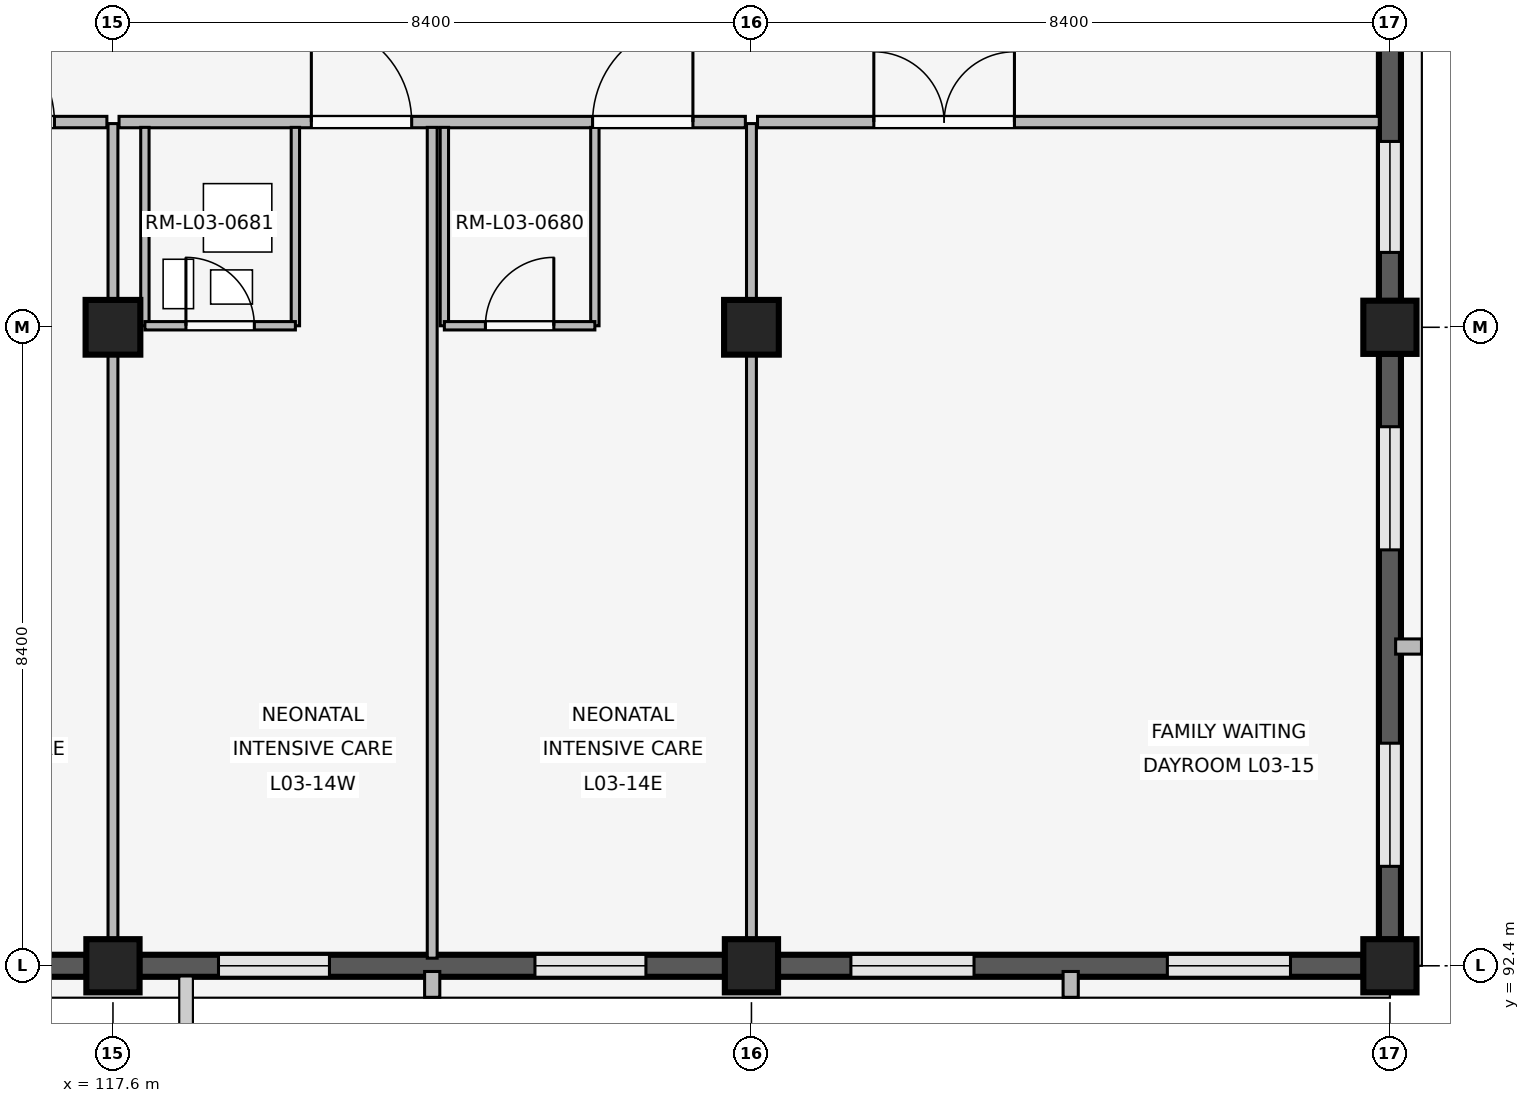
"""IFC4 building model, lengths in metres.
Left out: names, types, materials, properties, quantities, classifications, styles, units other than length and angle.
Written with IfcOpenShell. Run it as: python <this file> out.ifc"""

import sys

from ifc_helpers import new_model, si_unit, direction, frame, frame_2d, origin, origin_2d, place, context, subcontext, project, spatial, rectangle, extrude, element, fill, save


model = new_model("IFC4")
c1 = context("Model", 3, precision=1e-05, world=origin(), true_north=direction((0.0, 1.0)))
c2 = subcontext(c1, "Body", "Model", "MODEL_VIEW")
j1 = project(units=[si_unit("LENGTHUNIT", "METRE"), si_unit("PLANEANGLEUNIT", "RADIAN")], contexts=[c1])
p1 = place(None, origin())
s1 = spatial("IfcSite", under=j1, at=p1, CompositionType="ELEMENT")
p2 = place(p1, origin())
s2 = spatial("IfcBuilding", under=s1, at=p2, CompositionType="ELEMENT")
p3 = place(p2, frame((0.0, 0.0, 12.9)))
s3 = spatial("IfcBuildingStorey", under=s2, at=p3, CompositionType="ELEMENT", Elevation=12.9)
p4 = place(p3, frame((117.6, 92.4, 0.0), z_axis=(0.0, 0.0, 1.0), x_axis=(1.0, 0.0, 0.0)))
e1 = element("IfcColumn", 1, at=p4, inside=s3, PredefinedType="COLUMN", context=c2, shape_type="SweptSolid", body=[
    extrude(rectangle(XDim=0.7, YDim=0.7, at=origin_2d()), origin(), (0.0, 0.0, 1.0), 3.3),
])
p5 = place(p3, frame((117.6, 100.8, 0.0), z_axis=(0.0, 0.0, 1.0), x_axis=(1.0, 0.0, 0.0)))
e2 = element("IfcColumn", 2, at=p5, inside=s3, PredefinedType="COLUMN", context=c2, shape_type="SweptSolid", body=[
    extrude(rectangle(XDim=0.72, YDim=0.72, at=origin_2d()), origin(), (0.0, 0.0, 1.0), 3.3),
])
p6 = place(p3, frame((126.0, 92.4, 0.0), z_axis=(0.0, 0.0, 1.0), x_axis=(1.0, 0.0, 0.0)))
e3 = element("IfcColumn", 3, at=p6, inside=s3, PredefinedType="COLUMN", context=c2, shape_type="SweptSolid", body=[
    extrude(rectangle(XDim=0.7, YDim=0.7, at=origin_2d()), origin(), (0.0, 0.0, 1.0), 3.3),
])
p7 = place(p3, frame((126.0, 100.8, 0.0), z_axis=(0.0, 0.0, 1.0), x_axis=(1.0, 0.0, 0.0)))
e4 = element("IfcColumn", 4, at=p7, inside=s3, PredefinedType="COLUMN", context=c2, shape_type="SweptSolid", body=[
    extrude(rectangle(XDim=0.72, YDim=0.72, at=origin_2d()), origin(), (0.0, 0.0, 1.0), 3.3),
])
for number, where, z_axis, x_axis in (
    (5, (134.4, 92.4, 0.0), (0.0, 0.0, 1.0), (1.0, 0.0, 0.0)),
    (6, (134.4, 100.8, 0.0), (0.0, 0.0, 1.0), (1.0, 0.0, 0.0)),
):
    element("IfcColumn", number, at=place(p3, frame(where, z_axis=z_axis, x_axis=x_axis)), inside=s3, PredefinedType="COLUMN", context=c2, shape_type="SweptSolid", body=[
        extrude(rectangle(XDim=0.7, YDim=0.7, at=origin_2d()), origin(), (0.0, 0.0, 1.0), 3.3),
    ])
p8 = place(p3, frame((117.255, 92.4, 0.0), z_axis=(0.0, 0.0, 1.0), x_axis=(-1.0, 0.0, 0.0)))
e7 = element("IfcWall", 7, at=p8, inside=s3, PredefinedType="SOLIDWALL", context=c2, shape_type="SweptSolid", body=[
    extrude(rectangle(XDim=7.71, YDim=0.29, at=frame_2d((3.855, 0.0))), origin(), (0.0, 0.0, 1.0), 2.44),
])
p9 = place(p8, frame((0.963, 0.0, 0.85)))
e8 = element("IfcOpeningElement", 8, at=p9, cuts=e7, PredefinedType="OPENING", context=c2, shape_type="SweptSolid", body=[
    extrude(rectangle(XDim=1.62, YDim=0.95, at=frame_2d((0.81, 0.475))), frame((0.0, 0.155, 0.0), z_axis=(0.0, -1.0, 0.0), x_axis=(1.0, 0.0, 0.0)), (0.0, 0.0, 1.0), 0.31),
])
p10 = place(p8, frame((5.127, 0.0, 0.85)))
e9 = element("IfcOpeningElement", 9, at=p10, cuts=e7, PredefinedType="OPENING", context=c2, shape_type="SweptSolid", body=[
    extrude(rectangle(XDim=1.62, YDim=0.95, at=frame_2d((0.81, 0.475))), frame((0.0, 0.155, 0.0), z_axis=(0.0, -1.0, 0.0), x_axis=(1.0, 0.0, 0.0)), (0.0, 0.0, 1.0), 0.31),
])
p11 = place(p3, frame((125.655, 92.4, 0.0), z_axis=(0.0, 0.0, 1.0), x_axis=(-1.0, 0.0, 0.0)))
e10 = element("IfcWall", 10, at=p11, inside=s3, PredefinedType="SOLIDWALL", context=c2, shape_type="SweptSolid", body=[
    extrude(rectangle(XDim=7.71, YDim=0.29, at=frame_2d((3.855, 0.0))), origin(), (0.0, 0.0, 1.0), 2.44),
])
p12 = place(p11, frame((1.043, 0.0, 0.85)))
e11 = element("IfcOpeningElement", 11, at=p12, cuts=e10, PredefinedType="OPENING", context=c2, shape_type="SweptSolid", body=[
    extrude(rectangle(XDim=1.46, YDim=0.85, at=frame_2d((0.73, 0.425))), frame((0.0, 0.155, 0.0), z_axis=(0.0, -1.0, 0.0), x_axis=(1.0, 0.0, 0.0)), (0.0, 0.0, 1.0), 0.31),
])
p13 = place(p11, frame((5.207, 0.0, 0.85)))
e12 = element("IfcOpeningElement", 12, at=p13, cuts=e10, PredefinedType="OPENING", context=c2, shape_type="SweptSolid", body=[
    extrude(rectangle(XDim=1.46, YDim=0.85, at=frame_2d((0.73, 0.425))), frame((0.0, 0.155, 0.0), z_axis=(0.0, -1.0, 0.0), x_axis=(1.0, 0.0, 0.0)), (0.0, 0.0, 1.0), 0.31),
])
p14 = place(p3, frame((121.8, 92.325, 0.0), z_axis=(0.0, 0.0, 1.0), x_axis=(0.0, -1.0, 0.0)))
e13 = element("IfcWall", 13, at=p14, inside=s3, PredefinedType="ELEMENTEDWALL", context=c2, shape_type="SweptSolid", body=[
    extrude(rectangle(XDim=0.34, YDim=0.2, at=frame_2d((0.17, 0.0))), origin(), (0.0, 0.0, 1.0), 2.42),
])
p15 = place(p3, frame((134.055, 92.4, 0.0), z_axis=(0.0, 0.0, 1.0), x_axis=(-1.0, 0.0, 0.0)))
e14 = element("IfcWall", 14, at=p15, inside=s3, PredefinedType="SOLIDWALL", context=c2, shape_type="SweptSolid", body=[
    extrude(rectangle(XDim=7.71, YDim=0.29, at=frame_2d((3.855, 0.0))), origin(), (0.0, 0.0, 1.0), 2.44),
])
p16 = place(p15, frame((0.963, 0.0, 0.85)))
e15 = element("IfcOpeningElement", 15, at=p16, cuts=e14, PredefinedType="OPENING", context=c2, shape_type="SweptSolid", body=[
    extrude(rectangle(XDim=1.62, YDim=0.95, at=frame_2d((0.81, 0.475))), frame((0.0, 0.155, 0.0), z_axis=(0.0, -1.0, 0.0), x_axis=(1.0, 0.0, 0.0)), (0.0, 0.0, 1.0), 0.31),
])
p17 = place(p15, frame((5.127, 0.0, 0.85)))
e16 = element("IfcOpeningElement", 16, at=p17, cuts=e14, PredefinedType="OPENING", context=c2, shape_type="SweptSolid", body=[
    extrude(rectangle(XDim=1.62, YDim=0.95, at=frame_2d((0.81, 0.475))), frame((0.0, 0.155, 0.0), z_axis=(0.0, -1.0, 0.0), x_axis=(1.0, 0.0, 0.0)), (0.0, 0.0, 1.0), 0.31),
])
p18 = place(p3, frame((130.2, 92.325, 0.0), z_axis=(0.0, 0.0, 1.0), x_axis=(0.0, -1.0, 0.0)))
e17 = element("IfcWall", 17, at=p18, inside=s3, PredefinedType="ELEMENTEDWALL", context=c2, shape_type="SweptSolid", body=[
    extrude(rectangle(XDim=0.34, YDim=0.2, at=frame_2d((0.17, 0.0))), origin(), (0.0, 0.0, 1.0), 2.42),
])
p19 = place(p3, frame((134.4, 100.455, 0.0), z_axis=(0.0, 0.0, 1.0), x_axis=(0.0, -1.0, 0.0)))
e18 = element("IfcWall", 18, at=p19, inside=s3, PredefinedType="SOLIDWALL", context=c2, shape_type="SweptSolid", body=[
    extrude(rectangle(XDim=7.71, YDim=0.29, at=frame_2d((3.855, 0.0))), origin(), (0.0, 0.0, 1.0), 2.44),
])
p20 = place(p19, frame((0.963, 0.0, 0.85)))
e19 = element("IfcOpeningElement", 19, at=p20, cuts=e18, PredefinedType="OPENING", context=c2, shape_type="SweptSolid", body=[
    extrude(rectangle(XDim=1.62, YDim=0.95, at=frame_2d((0.81, 0.475))), frame((0.0, 0.155, 0.0), z_axis=(0.0, -1.0, 0.0), x_axis=(1.0, 0.0, 0.0)), (0.0, 0.0, 1.0), 0.31),
])
p21 = place(p19, frame((5.127, 0.0, 0.85)))
e20 = element("IfcOpeningElement", 20, at=p21, cuts=e18, PredefinedType="OPENING", context=c2, shape_type="SweptSolid", body=[
    extrude(rectangle(XDim=1.62, YDim=0.95, at=frame_2d((0.81, 0.475))), frame((0.0, 0.155, 0.0), z_axis=(0.0, -1.0, 0.0), x_axis=(1.0, 0.0, 0.0)), (0.0, 0.0, 1.0), 0.31),
])
p22 = place(p3, frame((134.475, 96.6, 0.0), z_axis=(0.0, 0.0, 1.0), x_axis=(1.0, 0.0, 0.0)))
e21 = element("IfcWall", 21, at=p22, inside=s3, PredefinedType="ELEMENTEDWALL", context=c2, shape_type="SweptSolid", body=[
    extrude(rectangle(XDim=0.34, YDim=0.2, at=frame_2d((0.17, 0.0))), origin(), (0.0, 0.0, 1.0), 2.42),
])
p23 = place(p3, frame((134.4, 108.855, 0.0), z_axis=(0.0, 0.0, 1.0), x_axis=(0.0, -1.0, 0.0)))
e22 = element("IfcWall", 22, at=p23, inside=s3, PredefinedType="SOLIDWALL", context=c2, shape_type="SweptSolid", body=[
    extrude(rectangle(XDim=7.71, YDim=0.29, at=frame_2d((3.855, 0.0))), origin(), (0.0, 0.0, 1.0), 2.44),
])
p24 = place(p23, frame((0.64, 0.0, 0.85)))
e23 = element("IfcOpeningElement", 23, at=p24, cuts=e22, PredefinedType="OPENING", context=c2, shape_type="SweptSolid", body=[
    extrude(rectangle(XDim=1.46, YDim=0.85, at=frame_2d((0.73, 0.425))), frame((0.0, 0.155, 0.0), z_axis=(0.0, -1.0, 0.0), x_axis=(1.0, 0.0, 0.0)), (0.0, 0.0, 1.0), 0.31),
])
p25 = place(p23, frame((5.61, 0.0, 0.85)))
e24 = element("IfcOpeningElement", 24, at=p25, cuts=e22, PredefinedType="OPENING", context=c2, shape_type="SweptSolid", body=[
    extrude(rectangle(XDim=1.46, YDim=0.85, at=frame_2d((0.73, 0.425))), frame((0.0, 0.155, 0.0), z_axis=(0.0, -1.0, 0.0), x_axis=(1.0, 0.0, 0.0)), (0.0, 0.0, 1.0), 0.31),
])
p26 = place(p3, frame((109.28, 103.5, 0.0), z_axis=(0.0, 0.0, 1.0), x_axis=(1.0, 0.0, 0.0)))
e25 = element("IfcWall", 25, at=p26, inside=s3, PredefinedType="PARTITIONING", context=c2, shape_type="SweptSolid", body=[
    extrude(rectangle(XDim=8.24, YDim=0.15, at=frame_2d((4.12, 0.0))), origin(), (0.0, 0.0, 1.0), 2.42),
])
p27 = place(p26, frame((2.53, 0.0, 0.0)))
e26 = element("IfcOpeningElement", 26, at=p27, cuts=e25, PredefinedType="OPENING", context=c2, shape_type="SweptSolid", body=[
    extrude(rectangle(XDim=1.32, YDim=2.25, at=frame_2d((0.66, 1.125))), frame((0.0, 0.085, 0.0), z_axis=(0.0, -1.0, 0.0), x_axis=(1.0, 0.0, 0.0)), (0.0, 0.0, 1.0), 0.17),
])
p28 = place(p26, frame((6.23, 0.0, 0.0)))
e27 = element("IfcOpeningElement", 27, at=p28, cuts=e25, PredefinedType="OPENING", context=c2, shape_type="SweptSolid", body=[
    extrude(rectangle(XDim=1.32, YDim=2.25, at=frame_2d((0.66, 1.125))), frame((0.0, 0.085, 0.0), z_axis=(0.0, -1.0, 0.0), x_axis=(1.0, 0.0, 0.0)), (0.0, 0.0, 1.0), 0.17),
])
p29 = place(p3, frame((117.6, 92.54, 0.0), z_axis=(0.0, 0.0, 1.0), x_axis=(0.0, 1.0, 0.0)))
e28 = element("IfcWall", 28, at=p29, inside=s3, PredefinedType="PARTITIONING", context=c2, shape_type="SweptSolid", body=[
    extrude(rectangle(XDim=10.94, YDim=0.13, at=frame_2d((5.47, 0.0))), origin(), (0.0, 0.0, 1.0), 2.42),
])
p30 = place(p3, frame((117.68, 103.5, 0.0), z_axis=(0.0, 0.0, 1.0), x_axis=(1.0, 0.0, 0.0)))
e29 = element("IfcWall", 29, at=p30, inside=s3, PredefinedType="PARTITIONING", context=c2, shape_type="SweptSolid", body=[
    extrude(rectangle(XDim=8.24, YDim=0.15, at=frame_2d((4.12, 0.0))), origin(), (0.0, 0.0, 1.0), 2.42),
])
p31 = place(p30, frame((2.53, 0.0, 0.0)))
e30 = element("IfcOpeningElement", 30, at=p31, cuts=e29, PredefinedType="OPENING", context=c2, shape_type="SweptSolid", body=[
    extrude(rectangle(XDim=1.32, YDim=2.25, at=frame_2d((0.66, 1.125))), frame((0.0, 0.085, 0.0), z_axis=(0.0, -1.0, 0.0), x_axis=(1.0, 0.0, 0.0)), (0.0, 0.0, 1.0), 0.17),
])
p32 = place(p30, frame((6.23, 0.0, 0.0)))
e31 = element("IfcOpeningElement", 31, at=p32, cuts=e29, PredefinedType="OPENING", context=c2, shape_type="SweptSolid", body=[
    extrude(rectangle(XDim=1.32, YDim=2.25, at=frame_2d((0.66, 1.125))), frame((0.0, 0.085, 0.0), z_axis=(0.0, -1.0, 0.0), x_axis=(1.0, 0.0, 0.0)), (0.0, 0.0, 1.0), 0.17),
])
p33 = place(p3, frame((121.8, 92.5, 0.0), z_axis=(0.0, 0.0, 1.0), x_axis=(0.0, 1.0, 0.0)))
e32 = element("IfcWall", 32, at=p33, inside=s3, PredefinedType="PARTITIONING", context=c2, shape_type="SweptSolid", body=[
    extrude(rectangle(XDim=10.93, YDim=0.13, at=frame_2d((5.465, 0.0))), origin(), (0.0, 0.0, 1.0), 2.42),
])
for number, where, z_axis, x_axis in (
    (33, (118.02, 100.82, 0.0), (0.0, 0.0, 1.0), (0.0, 1.0, 0.0)),
    (34, (120.0, 100.82, 0.0), (0.0, 0.0, 1.0), (0.0, 1.0, 0.0)),
):
    element("IfcWall", number, at=place(p3, frame(where, z_axis=z_axis, x_axis=x_axis)), inside=s3, PredefinedType="PARTITIONING", context=c2, shape_type="SweptSolid", body=[
        extrude(rectangle(XDim=2.61, YDim=0.11, at=frame_2d((1.305, 0.0))), origin(), (0.0, 0.0, 1.0), 2.42),
    ])
p34 = place(p3, frame((118.02, 100.82, 0.0), z_axis=(0.0, 0.0, 1.0), x_axis=(1.0, 0.0, 0.0)))
e35 = element("IfcWall", 35, at=p34, inside=s3, PredefinedType="PARTITIONING", context=c2, shape_type="SweptSolid", body=[
    extrude(rectangle(XDim=1.98, YDim=0.11, at=frame_2d((0.99, 0.0))), origin(), (0.0, 0.0, 1.0), 2.42),
])
p35 = place(p34, frame((0.54, 0.0, 0.0)))
e36 = element("IfcOpeningElement", 36, at=p35, cuts=e35, PredefinedType="OPENING", context=c2, shape_type="SweptSolid", body=[
    extrude(rectangle(XDim=0.9, YDim=2.1, at=frame_2d((0.45, 1.05))), frame((0.0, 0.065, 0.0), z_axis=(0.0, -1.0, 0.0), x_axis=(1.0, 0.0, 0.0)), (0.0, 0.0, 1.0), 0.13),
])
for number, where, z_axis, x_axis in (
    (37, (121.96, 100.82, 0.0), (0.0, 0.0, 1.0), (0.0, 1.0, 0.0)),
    (38, (123.94, 100.82, 0.0), (0.0, 0.0, 1.0), (0.0, 1.0, 0.0)),
):
    element("IfcWall", number, at=place(p3, frame(where, z_axis=z_axis, x_axis=x_axis)), inside=s3, PredefinedType="PARTITIONING", context=c2, shape_type="SweptSolid", body=[
        extrude(rectangle(XDim=2.61, YDim=0.11, at=frame_2d((1.305, 0.0))), origin(), (0.0, 0.0, 1.0), 2.42),
    ])
p36 = place(p3, frame((121.96, 100.82, 0.0), z_axis=(0.0, 0.0, 1.0), x_axis=(1.0, 0.0, 0.0)))
e39 = element("IfcWall", 39, at=p36, inside=s3, PredefinedType="PARTITIONING", context=c2, shape_type="SweptSolid", body=[
    extrude(rectangle(XDim=1.98, YDim=0.11, at=frame_2d((0.99, 0.0))), origin(), (0.0, 0.0, 1.0), 2.42),
])
p37 = place(p36, frame((0.54, 0.0, 0.0)))
e40 = element("IfcOpeningElement", 40, at=p37, cuts=e39, PredefinedType="OPENING", context=c2, shape_type="SweptSolid", body=[
    extrude(rectangle(XDim=0.9, YDim=2.1, at=frame_2d((0.45, 1.05))), frame((0.0, 0.065, 0.0), z_axis=(0.0, -1.0, 0.0), x_axis=(1.0, 0.0, 0.0)), (0.0, 0.0, 1.0), 0.13),
])
p38 = place(p3, frame((126.0, 92.54, 0.0), z_axis=(0.0, 0.0, 1.0), x_axis=(0.0, 1.0, 0.0)))
e41 = element("IfcWall", 41, at=p38, inside=s3, PredefinedType="PARTITIONING", context=c2, shape_type="SweptSolid", body=[
    extrude(rectangle(XDim=10.94, YDim=0.13, at=frame_2d((5.47, 0.0))), origin(), (0.0, 0.0, 1.0), 2.42),
])
p39 = place(p3, frame((126.08, 103.5, 0.0), z_axis=(0.0, 0.0, 1.0), x_axis=(1.0, 0.0, 0.0)))
e42 = element("IfcWall", 42, at=p39, inside=s3, PredefinedType="PARTITIONING", context=c2, shape_type="SweptSolid", body=[
    extrude(rectangle(XDim=8.18, YDim=0.15, at=frame_2d((4.09, 0.0))), origin(), (0.0, 0.0, 1.0), 2.42),
])
p40 = place(p39, frame((1.53, 0.0, 0.0)))
e43 = element("IfcOpeningElement", 43, at=p40, cuts=e42, PredefinedType="OPENING", context=c2, shape_type="SweptSolid", body=[
    extrude(rectangle(XDim=1.85, YDim=2.3, at=frame_2d((0.925, 1.15))), frame((0.0, 0.085, 0.0), z_axis=(0.0, -1.0, 0.0), x_axis=(1.0, 0.0, 0.0)), (0.0, 0.0, 1.0), 0.17),
])
p41 = place(p12, origin())
e44 = element("IfcWindow", 44, at=p41, inside=s3, PartitioningType="SINGLE_PANEL", PredefinedType="WINDOW", context=c2, shape_type="SweptSolid", body=[
    extrude(rectangle(XDim=1.46, YDim=0.85, at=frame_2d((0.73, 0.425))), frame((0.0, 0.03, 0.0), z_axis=(0.0, -1.0, 0.0), x_axis=(1.0, 0.0, 0.0)), (0.0, 0.0, 1.0), 0.06),
])
fill(e11, e44)
p42 = place(p13, origin())
e45 = element("IfcWindow", 45, at=p42, inside=s3, PartitioningType="SINGLE_PANEL", PredefinedType="WINDOW", context=c2, shape_type="SweptSolid", body=[
    extrude(rectangle(XDim=1.46, YDim=0.85, at=frame_2d((0.73, 0.425))), frame((0.0, 0.03, 0.0), z_axis=(0.0, -1.0, 0.0), x_axis=(1.0, 0.0, 0.0)), (0.0, 0.0, 1.0), 0.06),
])
fill(e12, e45)
p43 = place(p16, origin())
e46 = element("IfcWindow", 46, at=p43, inside=s3, PartitioningType="SINGLE_PANEL", PredefinedType="WINDOW", context=c2, shape_type="SweptSolid", body=[
    extrude(rectangle(XDim=1.62, YDim=0.95, at=frame_2d((0.81, 0.475))), frame((0.0, 0.03, 0.0), z_axis=(0.0, -1.0, 0.0), x_axis=(1.0, 0.0, 0.0)), (0.0, 0.0, 1.0), 0.06),
])
fill(e15, e46)
p44 = place(p17, origin())
e47 = element("IfcWindow", 47, at=p44, inside=s3, PartitioningType="SINGLE_PANEL", PredefinedType="WINDOW", context=c2, shape_type="SweptSolid", body=[
    extrude(rectangle(XDim=1.62, YDim=0.95, at=frame_2d((0.81, 0.475))), frame((0.0, 0.03, 0.0), z_axis=(0.0, -1.0, 0.0), x_axis=(1.0, 0.0, 0.0)), (0.0, 0.0, 1.0), 0.06),
])
fill(e16, e47)
p45 = place(p20, origin())
e48 = element("IfcWindow", 48, at=p45, inside=s3, PartitioningType="SINGLE_PANEL", PredefinedType="WINDOW", context=c2, shape_type="SweptSolid", body=[
    extrude(rectangle(XDim=1.62, YDim=0.95, at=frame_2d((0.81, 0.475))), frame((0.0, 0.03, 0.0), z_axis=(0.0, -1.0, 0.0), x_axis=(1.0, 0.0, 0.0)), (0.0, 0.0, 1.0), 0.06),
])
fill(e19, e48)
p46 = place(p21, origin())
e49 = element("IfcWindow", 49, at=p46, inside=s3, PartitioningType="SINGLE_PANEL", PredefinedType="WINDOW", context=c2, shape_type="SweptSolid", body=[
    extrude(rectangle(XDim=1.62, YDim=0.95, at=frame_2d((0.81, 0.475))), frame((0.0, 0.03, 0.0), z_axis=(0.0, -1.0, 0.0), x_axis=(1.0, 0.0, 0.0)), (0.0, 0.0, 1.0), 0.06),
])
fill(e20, e49)
p47 = place(p25, origin())
e50 = element("IfcWindow", 50, at=p47, inside=s3, PartitioningType="SINGLE_PANEL", PredefinedType="WINDOW", context=c2, shape_type="SweptSolid", body=[
    extrude(rectangle(XDim=1.46, YDim=0.85, at=frame_2d((0.73, 0.425))), frame((0.0, 0.03, 0.0), z_axis=(0.0, -1.0, 0.0), x_axis=(1.0, 0.0, 0.0)), (0.0, 0.0, 1.0), 0.06),
])
fill(e24, e50)
p48 = place(p28, origin())
e51 = element("IfcDoor", 51, at=p48, inside=s3, OperationType="SINGLE_SWING_LEFT", PredefinedType="DOOR", context=c2, shape_type="SweptSolid", body=[
    extrude(rectangle(XDim=1.32, YDim=2.25, at=frame_2d((0.66, 1.125))), frame((0.0, 0.025, 0.0), z_axis=(0.0, -1.0, 0.0), x_axis=(1.0, 0.0, 0.0)), (0.0, 0.0, 1.0), 0.05),
])
fill(e27, e51)
p49 = place(p31, origin())
e52 = element("IfcDoor", 52, at=p49, inside=s3, OperationType="SINGLE_SWING_LEFT", PredefinedType="DOOR", context=c2, shape_type="SweptSolid", body=[
    extrude(rectangle(XDim=1.32, YDim=2.25, at=frame_2d((0.66, 1.125))), frame((0.0, 0.025, 0.0), z_axis=(0.0, -1.0, 0.0), x_axis=(1.0, 0.0, 0.0)), (0.0, 0.0, 1.0), 0.05),
])
fill(e30, e52)
p50 = place(p32, origin())
e53 = element("IfcDoor", 53, at=p50, inside=s3, OperationType="SINGLE_SWING_RIGHT", PredefinedType="DOOR", context=c2, shape_type="SweptSolid", body=[
    extrude(rectangle(XDim=1.32, YDim=2.25, at=frame_2d((0.66, 1.125))), frame((0.0, 0.025, 0.0), z_axis=(0.0, -1.0, 0.0), x_axis=(1.0, 0.0, 0.0)), (0.0, 0.0, 1.0), 0.05),
])
fill(e31, e53)
p51 = place(p35, origin())
e54 = element("IfcDoor", 54, at=p51, inside=s3, OperationType="SINGLE_SWING_LEFT", PredefinedType="DOOR", context=c2, shape_type="SweptSolid", body=[
    extrude(rectangle(XDim=0.9, YDim=2.1, at=frame_2d((0.45, 1.05))), frame((0.0, 0.025, 0.0), z_axis=(0.0, -1.0, 0.0), x_axis=(1.0, 0.0, 0.0)), (0.0, 0.0, 1.0), 0.05),
])
fill(e36, e54)
p52 = place(p37, origin())
e55 = element("IfcDoor", 55, at=p52, inside=s3, OperationType="SINGLE_SWING_RIGHT", PredefinedType="DOOR", context=c2, shape_type="SweptSolid", body=[
    extrude(rectangle(XDim=0.9, YDim=2.1, at=frame_2d((0.45, 1.05))), frame((0.0, 0.025, 0.0), z_axis=(0.0, -1.0, 0.0), x_axis=(1.0, 0.0, 0.0)), (0.0, 0.0, 1.0), 0.05),
])
fill(e40, e55)
p53 = place(p40, origin())
e56 = element("IfcDoor", 56, at=p53, inside=s3, OperationType="DOUBLE_SWING_LEFT", PredefinedType="DOOR", context=c2, shape_type="SweptSolid", body=[
    extrude(rectangle(XDim=1.85, YDim=2.3, at=frame_2d((0.925, 1.15))), frame((0.0, 0.025, 0.0), z_axis=(0.0, -1.0, 0.0), x_axis=(1.0, 0.0, 0.0)), (0.0, 0.0, 1.0), 0.05),
])
fill(e43, e56)
save(model, sys.argv[1])
